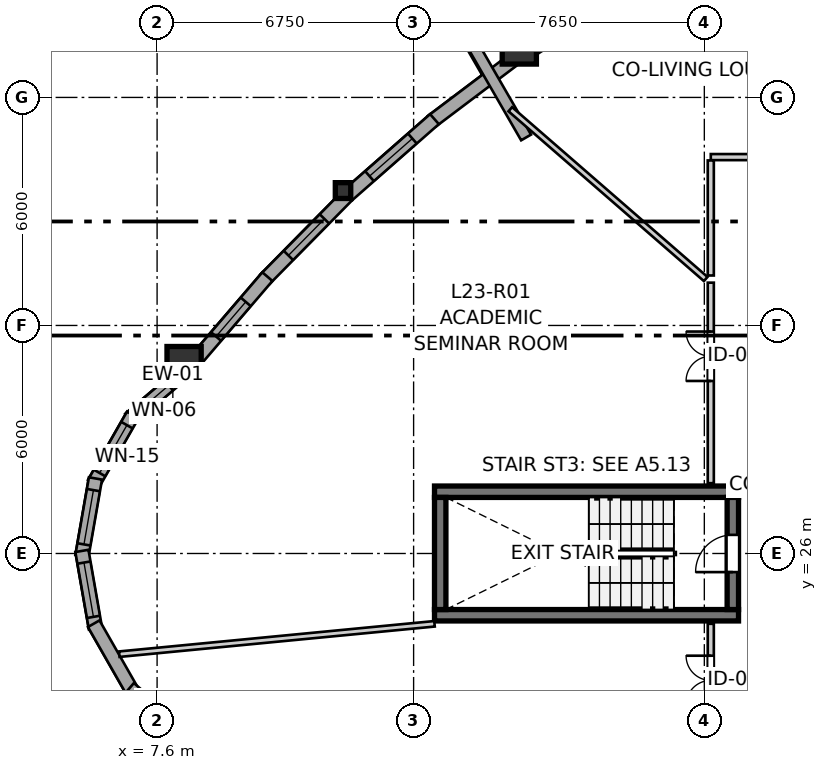
"""IFC4 building model, lengths in metres.
Left out: names, types, materials, properties, quantities, classifications, styles, units other than length and angle.
Written with IfcOpenShell. Run it as: python <this file> out.ifc"""

import sys

from ifc_helpers import new_model, si_unit, direction, frame, frame_2d, origin, origin_2d, place, context, subcontext, project, spatial, rectangle, i_section, extrude, source, transform, mapped, element, fill, save


model = new_model("IFC4")
c1 = context("Model", 3, precision=1e-05, world=origin(), true_north=direction((0.0, 1.0)))
c2 = subcontext(c1, "Body", "Model", "MODEL_VIEW")
j1 = project(units=[si_unit("LENGTHUNIT", "METRE"), si_unit("PLANEANGLEUNIT", "RADIAN")], contexts=[c1])
p1 = place(None, origin())
s1 = spatial("IfcSite", under=j1, at=p1, CompositionType="ELEMENT")
p2 = place(p1, origin())
s2 = spatial("IfcBuilding", under=s1, at=p2, CompositionType="ELEMENT")
p3 = place(p2, frame((0.0, 0.0, 80.0)))
s3 = spatial("IfcBuildingStorey", under=s2, at=p3, CompositionType="ELEMENT", Elevation=80.0)
for number, where, z_axis, x_axis in (
    (1, (14.9, 24.375, 0.0), (0.0, 0.0, 1.0), (1.0, 0.0, 0.0)),
    (2, (22.9, 27.625, 0.0), (0.0, 0.0, 1.0), (-1.0, 0.0, 0.0)),
):
    element("IfcWall", number, at=place(p3, frame(where, z_axis=z_axis, x_axis=x_axis)), inside=s3, PredefinedType="SHEAR", context=c2, shape_type="SweptSolid", body=[
        extrude(rectangle(XDim=8.0, YDim=0.3, at=frame_2d((4.0, 0.0))), origin(), (0.0, 0.0, 1.0), 2.935),
    ])
p4 = place(p3, frame((15.05, 27.475, 0.0), z_axis=(0.0, 0.0, 1.0), x_axis=(0.0, -1.0, 0.0)))
e3 = element("IfcWall", 3, at=p4, inside=s3, PredefinedType="SHEAR", context=c2, shape_type="SweptSolid", body=[
    extrude(rectangle(XDim=2.95, YDim=0.3, at=frame_2d((1.475, 0.0))), origin(), (0.0, 0.0, 1.0), 2.935),
])
p5 = place(p3, frame((22.75, 24.525, 0.0), z_axis=(0.0, 0.0, 1.0), x_axis=(0.0, 1.0, 0.0)))
e4 = element("IfcWall", 4, at=p5, inside=s3, PredefinedType="SHEAR", context=c2, shape_type="SweptSolid", body=[
    extrude(rectangle(XDim=2.95, YDim=0.3, at=frame_2d((1.475, 0.0))), origin(), (0.0, 0.0, 1.0), 2.935),
])
p6 = place(p5, frame((0.985, 0.0, 0.0)))
e5 = element("IfcOpeningElement", 5, at=p6, cuts=e4, PredefinedType="OPENING", context=c2, shape_type="SweptSolid", body=[
    extrude(rectangle(XDim=0.98, YDim=2.15, at=frame_2d((0.49, 1.075))), frame((0.0, 0.16, 0.0), z_axis=(0.0, -1.0, 0.0), x_axis=(1.0, 0.0, 0.0)), (0.0, 0.0, 1.0), 0.32),
])
m1 = source(origin(), c2, "Body", "SweptSolid", [
    extrude(rectangle(XDim=0.9, YDim=0.9, at=origin_2d()), origin(), (0.0, 0.0, 1.0), 2.935),
])
for number, where, z_axis, x_axis in (
    (6, (8.31, 30.996, 0.0), (0.0, 0.0, 1.0), (1.0, 0.0, 0.0)),
    (7, (17.131, 39.327, 0.0), (0.0, 0.0, 1.0), (1.0, 0.0, 0.0)),
):
    element("IfcColumn", number, at=place(p3, frame(where, z_axis=z_axis, x_axis=x_axis)), inside=s3, PredefinedType="COLUMN", context=c2, shape_type="MappedRepresentation", body=[
        mapped(m1, transform((0.0, 0.0, 0.0), x_axis=(1.0, 0.0, 0.0), y_axis=(0.0, 1.0, 0.0), z_axis=(0.0, 0.0, 1.0), scale=1.0)),
    ])
m2 = source(origin(), c2, "Body", "SweptSolid", [
    extrude(i_section(OverallWidth=0.406, OverallDepth=0.416, WebThickness=0.027, FlangeThickness=0.044, FilletRadius=0.015, at=origin_2d()), origin(), (0.0, 0.0, 1.0), 2.935),
])
p7 = place(p3, frame((12.493, 35.549, 0.0), z_axis=(0.0, 0.0, 1.0), x_axis=(1.0, 0.0, 0.0)))
e8 = element("IfcColumn", 8, at=p7, inside=s3, PredefinedType="PILASTER", context=c2, shape_type="MappedRepresentation", body=[
    mapped(m2, transform((0.0, 0.0, 0.0), x_axis=(1.0, 0.0, 0.0), y_axis=(0.0, 1.0, 0.0), z_axis=(0.0, 0.0, 1.0), scale=1.0)),
])
p8 = place(p3, frame((8.253, 30.717, 0.0), z_axis=(0.0, 0.0, 1.0), x_axis=(-0.761176639947, -0.648544618973, 0.0)))
e9 = element("IfcWall", 9, at=p8, inside=s3, PredefinedType="SOLIDWALL", context=c2, shape_type="SweptSolid", body=[
    extrude(rectangle(XDim=1.81, YDim=0.35, at=frame_2d((0.905, 0.0))), origin(), (0.0, 0.0, 1.0), 2.465),
])
p9 = place(p8, frame((0.455, 0.0, 0.82)))
e10 = element("IfcOpeningElement", 10, at=p9, cuts=e9, PredefinedType="OPENING", context=c2, shape_type="SweptSolid", body=[
    extrude(rectangle(XDim=1.05, YDim=1.45, at=frame_2d((0.525, 0.725))), frame((0.0, 0.185, 0.0), z_axis=(0.0, -1.0, 0.0), x_axis=(1.0, 0.0, 0.0)), (0.0, 0.0, 1.0), 0.37),
])
p10 = place(p3, frame((6.961, 29.647, 0.0), z_axis=(0.0, 0.0, 1.0), x_axis=(-0.496037473582, -0.868301114132, 0.0)))
e11 = element("IfcWall", 11, at=p10, inside=s3, PredefinedType="SOLIDWALL", context=c2, shape_type="SweptSolid", body=[
    extrude(rectangle(XDim=2.073, YDim=0.35, at=frame_2d((1.037, 0.0))), origin(), (0.0, 0.0, 1.0), 2.465),
])
p11 = place(p10, frame((0.312, 0.0, 0.82)))
e12 = element("IfcOpeningElement", 12, at=p11, cuts=e11, PredefinedType="OPENING", context=c2, shape_type="SweptSolid", body=[
    extrude(rectangle(XDim=1.45, YDim=1.25, at=frame_2d((0.725, 0.625))), frame((0.0, 0.185, 0.0), z_axis=(0.0, -1.0, 0.0), x_axis=(1.0, 0.0, 0.0)), (0.0, 0.0, 1.0), 0.37),
])
p12 = place(p3, frame((5.979, 27.975, 0.0), z_axis=(0.0, 0.0, 1.0), x_axis=(-0.172166087538, -0.985067935881, 0.0)))
e13 = element("IfcWall", 13, at=p12, inside=s3, PredefinedType="SOLIDWALL", context=c2, shape_type="SweptSolid", body=[
    extrude(rectangle(XDim=2.073, YDim=0.35, at=frame_2d((1.037, 0.0))), origin(), (0.0, 0.0, 1.0), 2.465),
])
p13 = place(p12, frame((0.312, 0.0, 0.82)))
e14 = element("IfcOpeningElement", 14, at=p13, cuts=e13, PredefinedType="OPENING", context=c2, shape_type="SweptSolid", body=[
    extrude(rectangle(XDim=1.45, YDim=1.25, at=frame_2d((0.725, 0.625))), frame((0.0, 0.185, 0.0), z_axis=(0.0, -1.0, 0.0), x_axis=(1.0, 0.0, 0.0)), (0.0, 0.0, 1.0), 0.37),
])
p14 = place(p3, frame((5.622, 26.068, 0.0), z_axis=(0.0, 0.0, 1.0), x_axis=(0.172166087538, -0.985067935881, 0.0)))
e15 = element("IfcWall", 15, at=p14, inside=s3, PredefinedType="SOLIDWALL", context=c2, shape_type="SweptSolid", body=[
    extrude(rectangle(XDim=2.073, YDim=0.35, at=frame_2d((1.037, 0.0))), origin(), (0.0, 0.0, 1.0), 2.465),
])
p15 = place(p14, frame((0.312, 0.0, 0.82)))
e16 = element("IfcOpeningElement", 16, at=p15, cuts=e15, PredefinedType="OPENING", context=c2, shape_type="SweptSolid", body=[
    extrude(rectangle(XDim=1.45, YDim=1.25, at=frame_2d((0.725, 0.625))), frame((0.0, 0.185, 0.0), z_axis=(0.0, -1.0, 0.0), x_axis=(1.0, 0.0, 0.0)), (0.0, 0.0, 1.0), 0.37),
])
p16 = place(p3, frame((5.933, 24.153, 0.0), z_axis=(0.0, 0.0, 1.0), x_axis=(0.496037473582, -0.868301114132, 0.0)))
e17 = element("IfcWall", 17, at=p16, inside=s3, PredefinedType="SOLIDWALL", context=c2, shape_type="SweptSolid", body=[
    extrude(rectangle(XDim=2.073, YDim=0.35, at=frame_2d((1.037, 0.0))), origin(), (0.0, 0.0, 1.0), 2.465),
])
p17 = place(p3, frame((6.875, 22.457, 0.0), z_axis=(0.0, 0.0, 1.0), x_axis=(0.761203352049, -0.648513266502, 0.0)))
e18 = element("IfcWall", 18, at=p17, inside=s3, PredefinedType="SOLIDWALL", context=c2, shape_type="SweptSolid", body=[
    extrude(rectangle(XDim=2.015, YDim=0.35, at=frame_2d((1.007, 0.0))), origin(), (0.0, 0.0, 1.0), 2.465),
])
p18 = place(p17, frame((0.393, 0.0, 0.82)))
e19 = element("IfcOpeningElement", 19, at=p18, cuts=e18, PredefinedType="OPENING", context=c2, shape_type="SweptSolid", body=[
    extrude(rectangle(XDim=1.25, YDim=1.35, at=frame_2d((0.625, 0.675))), frame((0.0, 0.185, 0.0), z_axis=(0.0, -1.0, 0.0), x_axis=(1.0, 0.0, 0.0)), (0.0, 0.0, 1.0), 0.37),
])
p19 = place(p3, frame((17.057, 39.052, 0.0), z_axis=(0.0, 0.0, 1.0), x_axis=(-0.798379678642, -0.602154372841, 0.0)))
e20 = element("IfcWall", 20, at=p19, inside=s3, PredefinedType="SOLIDWALL", context=c2, shape_type="SweptSolid", body=[
    extrude(rectangle(XDim=2.79, YDim=0.35, at=frame_2d((1.395, 0.0))), origin(), (0.0, 0.0, 1.0), 2.465),
])
p20 = place(p3, frame((14.899, 37.429, 0.0), z_axis=(0.0, 0.0, 1.0), x_axis=(-0.751526984469, -0.659702350773, 0.0)))
e21 = element("IfcWall", 21, at=p20, inside=s3, PredefinedType="SOLIDWALL", context=c2, shape_type="SweptSolid", body=[
    extrude(rectangle(XDim=3.028, YDim=0.35, at=frame_2d((1.514, 0.0))), origin(), (0.0, 0.0, 1.0), 2.465),
])
p21 = place(p20, frame((0.774, 0.0, 0.82)))
e22 = element("IfcOpeningElement", 22, at=p21, cuts=e21, PredefinedType="OPENING", context=c2, shape_type="SweptSolid", body=[
    extrude(rectangle(XDim=1.5, YDim=1.45, at=frame_2d((0.75, 0.725))), frame((0.0, 0.185, 0.0), z_axis=(0.0, -1.0, 0.0), x_axis=(1.0, 0.0, 0.0)), (0.0, 0.0, 1.0), 0.37),
])
p22 = place(p3, frame((12.603, 35.412, 0.0), z_axis=(0.0, 0.0, 1.0), x_axis=(-0.701972782373, -0.71220377197, 0.0)))
e23 = element("IfcWall", 23, at=p22, inside=s3, PredefinedType="SOLIDWALL", context=c2, shape_type="SweptSolid", body=[
    extrude(rectangle(XDim=3.078, YDim=0.35, at=frame_2d((1.539, 0.0))), origin(), (0.0, 0.0, 1.0), 2.465),
])
p23 = place(p22, frame((0.854, 0.0, 0.82)))
e24 = element("IfcOpeningElement", 24, at=p23, cuts=e23, PredefinedType="OPENING", context=c2, shape_type="SweptSolid", body=[
    extrude(rectangle(XDim=1.35, YDim=1.45, at=frame_2d((0.675, 0.725))), frame((0.0, 0.185, 0.0), z_axis=(0.0, -1.0, 0.0), x_axis=(1.0, 0.0, 0.0)), (0.0, 0.0, 1.0), 0.37),
])
p24 = place(p3, frame((10.502, 33.285, 0.0), z_axis=(0.0, 0.0, 1.0), x_axis=(-0.650770847407, -0.75927419564, 0.0)))
e25 = element("IfcWall", 25, at=p24, inside=s3, PredefinedType="SOLIDWALL", context=c2, shape_type="SweptSolid", body=[
    extrude(rectangle(XDim=2.938, YDim=0.35, at=frame_2d((1.469, 0.0))), origin(), (0.0, 0.0, 1.0), 2.465),
])
p25 = place(p24, frame((0.874, 0.0, 0.82)))
e26 = element("IfcOpeningElement", 26, at=p25, cuts=e25, PredefinedType="OPENING", context=c2, shape_type="SweptSolid", body=[
    extrude(rectangle(XDim=1.2, YDim=1.45, at=frame_2d((0.6, 0.725))), frame((0.0, 0.185, 0.0), z_axis=(0.0, -1.0, 0.0), x_axis=(1.0, 0.0, 0.0)), (0.0, 0.0, 1.0), 0.37),
])
p26 = place(p3, frame((17.31, 36.946, 0.0), z_axis=(0.0, 0.0, 1.0), x_axis=(-0.499999403898, 0.866025747944, 0.0)))
e27 = element("IfcWall", 27, at=p26, inside=s3, PredefinedType="SOLIDWALL", context=c2, shape_type="SweptSolid", body=[
    extrude(rectangle(XDim=20.603, YDim=0.3, at=frame_2d((10.302, 0.0))), origin(), (0.0, 0.0, 1.0), 2.115),
])
p27 = place(p3, frame((22.17, 27.85, 0.0), z_axis=(0.0, 0.0, 1.0), x_axis=(0.0, 1.0, 0.0)))
e28 = element("IfcWall", 28, at=p27, inside=s3, PredefinedType="PARTITIONING", context=c2, shape_type="SweptSolid", body=[
    extrude(rectangle(XDim=5.276, YDim=0.16, at=frame_2d((2.638, 0.0))), origin(), (0.0, 0.0, 1.0), 2.935),
])
p28 = place(p27, frame((2.689, 0.0, 0.0)))
e29 = element("IfcOpeningElement", 29, at=p28, cuts=e28, PredefinedType="OPENING", context=c2, shape_type="SweptSolid", body=[
    extrude(rectangle(XDim=1.3, YDim=2.1, at=frame_2d((0.65, 1.05))), frame((0.0, 0.09, 0.0), z_axis=(0.0, -1.0, 0.0), x_axis=(1.0, 0.0, 0.0)), (0.0, 0.0, 1.0), 0.18),
])
p29 = place(p3, frame((22.17, 36.43, 0.0), z_axis=(0.0, 0.0, 1.0), x_axis=(1.0, 0.0, 0.0)))
e30 = element("IfcWall", 30, at=p29, inside=s3, PredefinedType="PARTITIONING", context=c2, shape_type="SweptSolid", body=[
    extrude(rectangle(XDim=5.122, YDim=0.16, at=frame_2d((2.561, 0.0))), origin(), (0.0, 0.0, 1.0), 2.573),
])
p30 = place(p29, frame((1.903, 0.0, 0.0)))
e31 = element("IfcOpeningElement", 31, at=p30, cuts=e30, PredefinedType="OPENING", context=c2, shape_type="SweptSolid", body=[
    extrude(rectangle(XDim=1.3, YDim=2.1, at=frame_2d((0.65, 1.05))), frame((0.0, 0.09, 0.0), z_axis=(0.0, -1.0, 0.0), x_axis=(1.0, 0.0, 0.0)), (0.0, 0.0, 1.0), 0.18),
])
p31 = place(p3, frame((22.17, 21.128, 0.0), z_axis=(0.0, 0.0, 1.0), x_axis=(0.0, 1.0, 0.0)))
e32 = element("IfcWall", 32, at=p31, inside=s3, PredefinedType="PARTITIONING", context=c2, shape_type="SweptSolid", body=[
    extrude(rectangle(XDim=3.022, YDim=0.16, at=frame_2d((1.511, 0.0))), origin(), (0.0, 0.0, 1.0), 2.935),
])
p32 = place(p31, frame((0.883, 0.0, 0.0)))
e33 = element("IfcOpeningElement", 33, at=p32, cuts=e32, PredefinedType="OPENING", context=c2, shape_type="SweptSolid", body=[
    extrude(rectangle(XDim=1.3, YDim=2.1, at=frame_2d((0.65, 1.05))), frame((0.0, 0.09, 0.0), z_axis=(0.0, -1.0, 0.0), x_axis=(1.0, 0.0, 0.0)), (0.0, 0.0, 1.0), 0.18),
])
p33 = place(p3, frame((6.605, 23.351, 0.0), z_axis=(0.0, 0.0, 1.0), x_axis=(0.995388985265, 0.09592063393, 0.0)))
e34 = element("IfcWall", 34, at=p33, inside=s3, PredefinedType="PARTITIONING", context=c2, shape_type="SweptSolid", body=[
    extrude(rectangle(XDim=8.333, YDim=0.145, at=frame_2d((4.167, 0.0))), origin(), (0.0, 0.0, 1.0), 2.935),
])
p34 = place(p3, frame((16.895, 37.69, 0.0), z_axis=(0.0, 0.0, 1.0), x_axis=(0.754854710059, -0.655892038907, 0.0)))
e35 = element("IfcWall", 35, at=p34, inside=s3, PredefinedType="PARTITIONING", context=c2, shape_type="SweptSolid", body=[
    extrude(rectangle(XDim=6.811, YDim=0.145, at=frame_2d((3.406, 0.0))), origin(), (0.0, 0.0, 1.0), 2.103),
])
p35 = place(p3, frame((22.17, 33.315, 0.0), z_axis=(0.0, 0.0, 1.0), x_axis=(0.0, 1.0, 0.0)))
e36 = element("IfcWall", 36, at=p35, inside=s3, PredefinedType="PARTITIONING", context=c2, shape_type="SweptSolid", body=[
    extrude(rectangle(XDim=3.027, YDim=0.16, at=frame_2d((1.514, 0.0))), origin(), (0.0, 0.0, 1.0), 2.935),
])
p36 = place(p3, frame((17.326, 39.048, 0.0), z_axis=(0.0, 0.0, 1.0), x_axis=(0.841527071554, 0.540214945963, 0.0)))
e37 = element("IfcWall", 37, at=p36, inside=s3, PredefinedType="PARTITIONING", context=c2, shape_type="SweptSolid", body=[
    extrude(rectangle(XDim=2.934, YDim=0.145, at=frame_2d((1.467, 0.0))), origin(), (0.0, 0.0, 1.0), 2.453),
])
m3 = source(origin(), c2, "Body", "SweptSolid", [
    extrude(rectangle(XDim=1.05, YDim=1.45, at=frame_2d((0.525, 0.725))), frame((0.0, 0.03, 0.0), z_axis=(0.0, -1.0, 0.0), x_axis=(1.0, 0.0, 0.0)), (0.0, 0.0, 1.0), 0.06),
])
p37 = place(p9, origin())
e38 = element("IfcWindow", 38, at=p37, inside=s3, PartitioningType="SINGLE_PANEL", PredefinedType="WINDOW", context=c2, shape_type="MappedRepresentation", body=[
    mapped(m3, transform((0.0, 0.0, 0.0), x_axis=(1.0, 0.0, 0.0), y_axis=(0.0, 1.0, 0.0), z_axis=(0.0, 0.0, 1.0), scale=1.0)),
])
fill(e10, e38)
m4 = source(origin(), c2, "Body", "SweptSolid", [
    extrude(rectangle(XDim=1.45, YDim=1.25, at=frame_2d((0.725, 0.625))), frame((0.0, 0.03, 0.0), z_axis=(0.0, -1.0, 0.0), x_axis=(1.0, 0.0, 0.0)), (0.0, 0.0, 1.0), 0.06),
])
p38 = place(p11, origin())
e39 = element("IfcWindow", 39, at=p38, inside=s3, PartitioningType="SINGLE_PANEL", PredefinedType="WINDOW", context=c2, shape_type="MappedRepresentation", body=[
    mapped(m4, transform((0.0, 0.0, 0.0), x_axis=(1.0, 0.0, 0.0), y_axis=(0.0, 1.0, 0.0), z_axis=(0.0, 0.0, 1.0), scale=1.0)),
])
fill(e12, e39)
p39 = place(p13, origin())
e40 = element("IfcWindow", 40, at=p39, inside=s3, PartitioningType="SINGLE_PANEL", PredefinedType="WINDOW", context=c2, shape_type="MappedRepresentation", body=[
    mapped(m4, transform((0.0, 0.0, 0.0), x_axis=(1.0, 0.0, 0.0), y_axis=(0.0, 1.0, 0.0), z_axis=(0.0, 0.0, 1.0), scale=1.0)),
])
fill(e14, e40)
p40 = place(p15, origin())
e41 = element("IfcWindow", 41, at=p40, inside=s3, PartitioningType="SINGLE_PANEL", PredefinedType="WINDOW", context=c2, shape_type="MappedRepresentation", body=[
    mapped(m4, transform((0.0, 0.0, 0.0), x_axis=(1.0, 0.0, 0.0), y_axis=(0.0, 1.0, 0.0), z_axis=(0.0, 0.0, 1.0), scale=1.0)),
])
fill(e16, e41)
m5 = source(origin(), c2, "Body", "SweptSolid", [
    extrude(rectangle(XDim=1.5, YDim=1.45, at=frame_2d((0.75, 0.725))), frame((0.0, 0.03, 0.0), z_axis=(0.0, -1.0, 0.0), x_axis=(1.0, 0.0, 0.0)), (0.0, 0.0, 1.0), 0.06),
])
p41 = place(p21, origin())
e42 = element("IfcWindow", 42, at=p41, inside=s3, PartitioningType="SINGLE_PANEL", PredefinedType="WINDOW", context=c2, shape_type="MappedRepresentation", body=[
    mapped(m5, transform((0.0, 0.0, 0.0), x_axis=(1.0, 0.0, 0.0), y_axis=(0.0, 1.0, 0.0), z_axis=(0.0, 0.0, 1.0), scale=1.0)),
])
fill(e22, e42)
m6 = source(origin(), c2, "Body", "SweptSolid", [
    extrude(rectangle(XDim=1.35, YDim=1.45, at=frame_2d((0.675, 0.725))), frame((0.0, 0.03, 0.0), z_axis=(0.0, -1.0, 0.0), x_axis=(1.0, 0.0, 0.0)), (0.0, 0.0, 1.0), 0.06),
])
p42 = place(p23, origin())
e43 = element("IfcWindow", 43, at=p42, inside=s3, PartitioningType="SINGLE_PANEL", PredefinedType="WINDOW", context=c2, shape_type="MappedRepresentation", body=[
    mapped(m6, transform((0.0, 0.0, 0.0), x_axis=(1.0, 0.0, 0.0), y_axis=(0.0, 1.0, 0.0), z_axis=(0.0, 0.0, 1.0), scale=1.0)),
])
fill(e24, e43)
m7 = source(origin(), c2, "Body", "SweptSolid", [
    extrude(rectangle(XDim=1.2, YDim=1.45, at=frame_2d((0.6, 0.725))), frame((0.0, 0.03, 0.0), z_axis=(0.0, -1.0, 0.0), x_axis=(1.0, 0.0, 0.0)), (0.0, 0.0, 1.0), 0.06),
])
p43 = place(p25, origin())
e44 = element("IfcWindow", 44, at=p43, inside=s3, PartitioningType="SINGLE_PANEL", PredefinedType="WINDOW", context=c2, shape_type="MappedRepresentation", body=[
    mapped(m7, transform((0.0, 0.0, 0.0), x_axis=(1.0, 0.0, 0.0), y_axis=(0.0, 1.0, 0.0), z_axis=(0.0, 0.0, 1.0), scale=1.0)),
])
fill(e26, e44)
m8 = source(origin(), c2, "Body", "SweptSolid", [
    extrude(rectangle(XDim=0.98, YDim=2.15, at=frame_2d((0.49, 1.075))), frame((0.0, 0.025, 0.0), z_axis=(0.0, -1.0, 0.0), x_axis=(1.0, 0.0, 0.0)), (0.0, 0.0, 1.0), 0.05),
])
p44 = place(p6, origin())
e45 = element("IfcDoor", 45, at=p44, inside=s3, OperationType="SINGLE_SWING_LEFT", PredefinedType="DOOR", context=c2, shape_type="MappedRepresentation", body=[
    mapped(m8, transform((0.0, 0.0, 0.0), x_axis=(1.0, 0.0, 0.0), y_axis=(0.0, 1.0, 0.0), z_axis=(0.0, 0.0, 1.0), scale=1.0)),
])
fill(e5, e45)
m9 = source(origin(), c2, "Body", "SweptSolid", [
    extrude(rectangle(XDim=1.3, YDim=2.1, at=frame_2d((0.65, 1.05))), frame((0.0, 0.025, 0.0), z_axis=(0.0, -1.0, 0.0), x_axis=(1.0, 0.0, 0.0)), (0.0, 0.0, 1.0), 0.05),
])
p45 = place(p28, origin())
e46 = element("IfcDoor", 46, at=p45, inside=s3, OperationType="DOUBLE_DOOR_SINGLE_SWING", PredefinedType="DOOR", context=c2, shape_type="MappedRepresentation", body=[
    mapped(m9, transform((0.0, 0.0, 0.0), x_axis=(1.0, 0.0, 0.0), y_axis=(0.0, 1.0, 0.0), z_axis=(0.0, 0.0, 1.0), scale=1.0)),
])
fill(e29, e46)
p46 = place(p32, origin())
e47 = element("IfcDoor", 47, at=p46, inside=s3, OperationType="DOUBLE_DOOR_SINGLE_SWING", PredefinedType="DOOR", context=c2, shape_type="MappedRepresentation", body=[
    mapped(m9, transform((0.0, 0.0, 0.0), x_axis=(1.0, 0.0, 0.0), y_axis=(0.0, 1.0, 0.0), z_axis=(0.0, 0.0, 1.0), scale=1.0)),
])
fill(e33, e47)
save(model, sys.argv[1])
